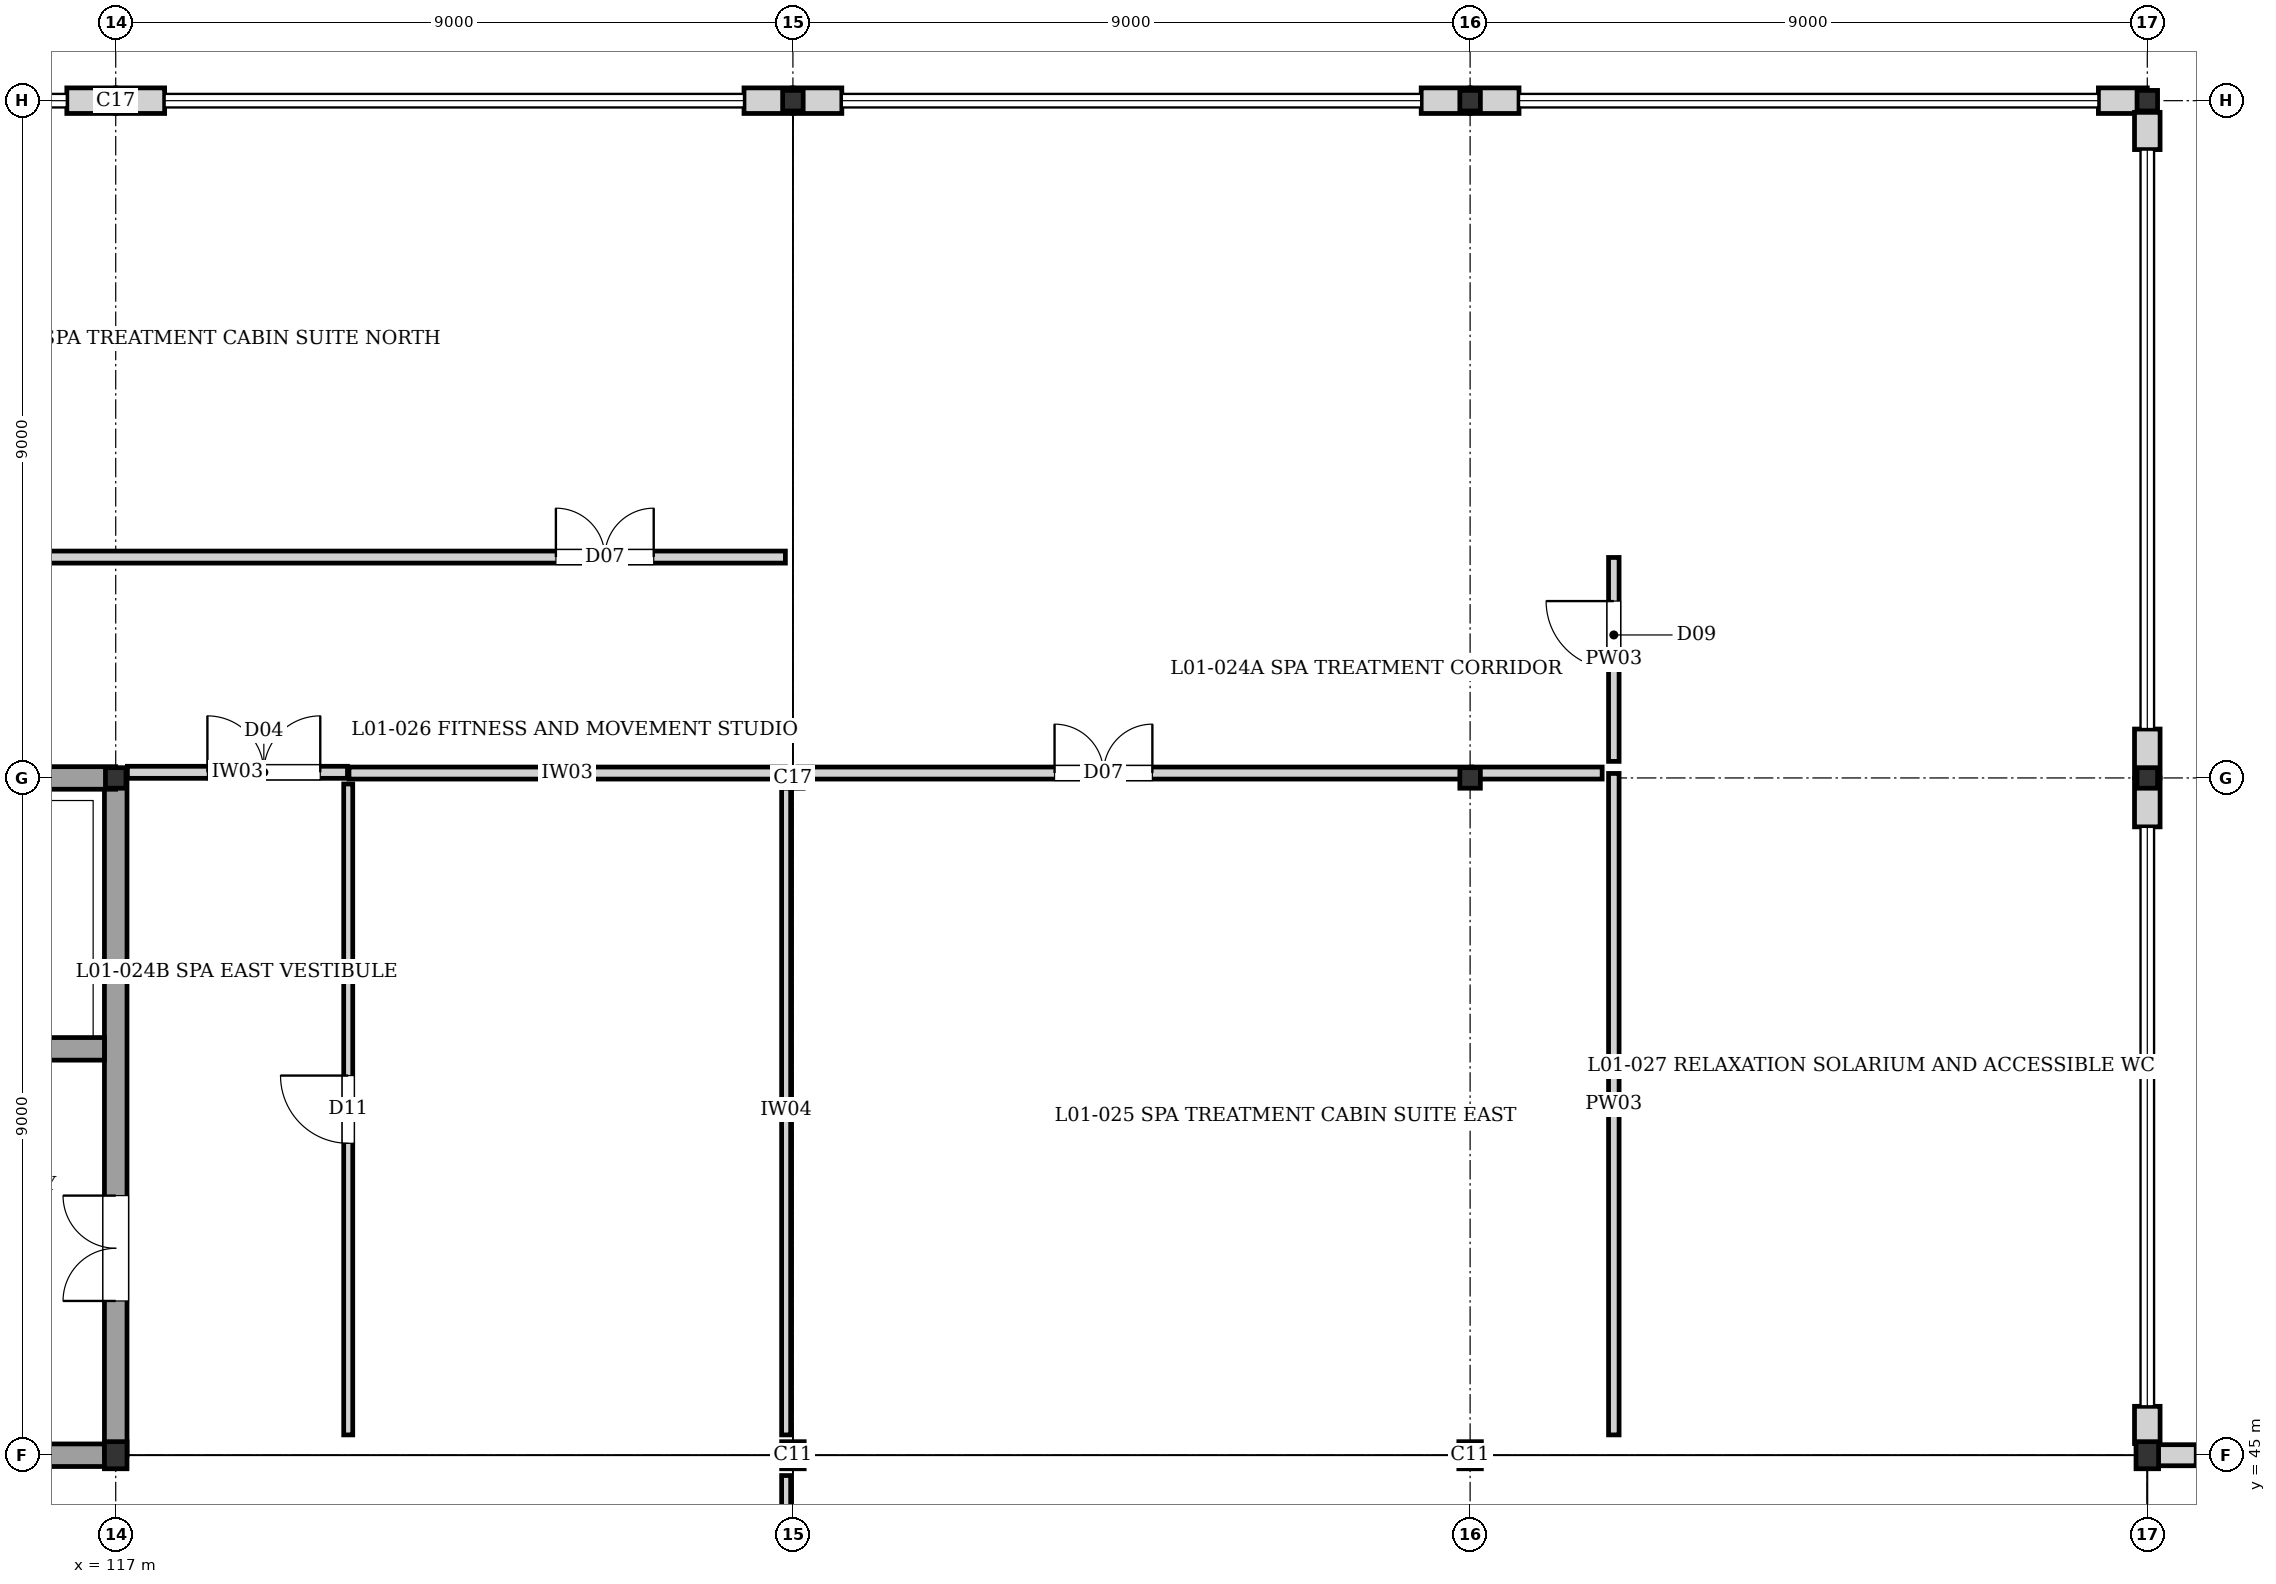
"""IFC4 building model, lengths in metres.
Left out: names, types, materials, properties, quantities, classifications, styles, units other than length and angle.
Written with IfcOpenShell. Run it as: python <this file> out.ifc"""

import sys

from ifc_helpers import new_model, si_unit, direction, frame, frame_2d, origin, origin_2d, place, context, subcontext, project, spatial, rectangle, hollow_circle, i_section, extrude, element, fill, save


model = new_model("IFC4")
c1 = context("Model", 3, precision=1e-05, world=origin(), true_north=direction((0.0, 1.0)))
c2 = subcontext(c1, "Body", "Model", "MODEL_VIEW")
j1 = project(units=[si_unit("LENGTHUNIT", "METRE"), si_unit("PLANEANGLEUNIT", "RADIAN")], contexts=[c1])
p1 = place(None, origin())
s1 = spatial("IfcSite", under=j1, at=p1, CompositionType="ELEMENT")
p2 = place(p1, origin())
s2 = spatial("IfcBuilding", under=s1, at=p2, CompositionType="ELEMENT")
p3 = place(p2, frame((0.0, 0.0, 4.32)))
s3 = spatial("IfcBuildingStorey", under=s2, at=p3, CompositionType="ELEMENT", Elevation=4.32)
p4 = place(p3, frame((117.0, 45.0, 0.0), z_axis=(0.0, 0.0, 1.0), x_axis=(1.0, 0.0, 0.0)))
e1 = element("IfcColumn", 1, at=p4, inside=s3, PredefinedType="COLUMN", context=c2, shape_type="SweptSolid", body=[
    extrude(i_section(OverallWidth=0.3, OverallDepth=0.36, WebThickness=0.012, FlangeThickness=0.022, at=origin_2d()), origin(), (0.0, 0.0, 1.0), 3.84),
])
for number, where, z_axis, x_axis in (
    (2, (117.0, 54.0, 0.0), (0.0, 0.0, 1.0), (1.0, 0.0, 0.0)),
    (3, (117.0, 63.0, 0.0), (0.0, 0.0, 1.0), (1.0, 0.0, 0.0)),
):
    element("IfcColumn", number, at=place(p3, frame(where, z_axis=z_axis, x_axis=x_axis)), inside=s3, PredefinedType="COLUMN", context=c2, shape_type="SweptSolid", body=[
        extrude(hollow_circle(Radius=0.136, WallThickness=0.012, at=origin_2d()), origin(), (0.0, 0.0, 1.0), 3.84),
    ])
p5 = place(p3, frame((126.0, 45.0, 0.0), z_axis=(0.0, 0.0, 1.0), x_axis=(1.0, 0.0, 0.0)))
e4 = element("IfcColumn", 4, at=p5, inside=s3, PredefinedType="COLUMN", context=c2, shape_type="SweptSolid", body=[
    extrude(i_section(OverallWidth=0.3, OverallDepth=0.36, WebThickness=0.012, FlangeThickness=0.022, at=origin_2d()), origin(), (0.0, 0.0, 1.0), 3.84),
])
for number, where, z_axis, x_axis in (
    (5, (126.0, 54.0, 0.0), (0.0, 0.0, 1.0), (1.0, 0.0, 0.0)),
    (6, (126.0, 63.0, 0.0), (0.0, 0.0, 1.0), (1.0, 0.0, 0.0)),
):
    element("IfcColumn", number, at=place(p3, frame(where, z_axis=z_axis, x_axis=x_axis)), inside=s3, PredefinedType="COLUMN", context=c2, shape_type="SweptSolid", body=[
        extrude(hollow_circle(Radius=0.136, WallThickness=0.012, at=origin_2d()), origin(), (0.0, 0.0, 1.0), 3.84),
    ])
p6 = place(p3, frame((135.0, 45.0, 0.0), z_axis=(0.0, 0.0, 1.0), x_axis=(1.0, 0.0, 0.0)))
e7 = element("IfcColumn", 7, at=p6, inside=s3, PredefinedType="COLUMN", context=c2, shape_type="SweptSolid", body=[
    extrude(i_section(OverallWidth=0.3, OverallDepth=0.36, WebThickness=0.012, FlangeThickness=0.022, at=origin_2d()), origin(), (0.0, 0.0, 1.0), 3.84),
])
for number, where, z_axis, x_axis in (
    (8, (135.0, 54.0, 0.0), (0.0, 0.0, 1.0), (1.0, 0.0, 0.0)),
    (9, (135.0, 63.0, 0.0), (0.0, 0.0, 1.0), (1.0, 0.0, 0.0)),
):
    element("IfcColumn", number, at=place(p3, frame(where, z_axis=z_axis, x_axis=x_axis)), inside=s3, PredefinedType="COLUMN", context=c2, shape_type="SweptSolid", body=[
        extrude(hollow_circle(Radius=0.136, WallThickness=0.012, at=origin_2d()), origin(), (0.0, 0.0, 1.0), 3.84),
    ])
p7 = place(p3, frame((144.0, 45.0, 0.0), z_axis=(0.0, 0.0, 1.0), x_axis=(1.0, 0.0, 0.0)))
e10 = element("IfcColumn", 10, at=p7, inside=s3, PredefinedType="COLUMN", context=c2, shape_type="SweptSolid", body=[
    extrude(i_section(OverallWidth=0.3, OverallDepth=0.36, WebThickness=0.012, FlangeThickness=0.022, at=origin_2d()), origin(), (0.0, 0.0, 1.0), 3.84),
])
for number, where, z_axis, x_axis in (
    (11, (144.0, 54.0, 0.0), (0.0, 0.0, 1.0), (1.0, 0.0, 0.0)),
    (12, (144.0, 63.0, 0.0), (0.0, 0.0, 1.0), (1.0, 0.0, 0.0)),
):
    element("IfcColumn", number, at=place(p3, frame(where, z_axis=z_axis, x_axis=x_axis)), inside=s3, PredefinedType="COLUMN", context=c2, shape_type="SweptSolid", body=[
        extrude(hollow_circle(Radius=0.136, WallThickness=0.012, at=origin_2d()), origin(), (0.0, 0.0, 1.0), 3.84),
    ])
p8 = place(p3, frame((116.35, 63.0, 0.0), z_axis=(0.0, 0.0, 1.0), x_axis=(1.0, 0.0, 0.0)))
e13 = element("IfcWall", 13, at=p8, inside=s3, PredefinedType="SOLIDWALL", context=c2, shape_type="SweptSolid", body=[
    extrude(rectangle(XDim=0.65, YDim=0.34, at=frame_2d((0.325, 0.0))), origin(), (0.0, 0.0, 1.0), 3.18),
])
for number, where, z_axis, x_axis in (
    (14, (117.0, 63.0, 0.0), (0.0, 0.0, 1.0), (1.0, 0.0, 0.0)),
    (15, (125.35, 63.0, 0.0), (0.0, 0.0, 1.0), (1.0, 0.0, 0.0)),
):
    element("IfcWall", number, at=place(p3, frame(where, z_axis=z_axis, x_axis=x_axis)), inside=s3, PredefinedType="SOLIDWALL", context=c2, shape_type="SweptSolid", body=[
        extrude(rectangle(XDim=0.65, YDim=0.34, at=frame_2d((0.325, 0.0))), origin(), (0.0, 0.0, 1.0), 3.35),
    ])
for number, where, z_axis, x_axis in (
    (16, (126.0, 63.0, 0.0), (0.0, 0.0, 1.0), (1.0, 0.0, 0.0)),
    (17, (134.35, 63.0, 0.0), (0.0, 0.0, 1.0), (1.0, 0.0, 0.0)),
):
    element("IfcWall", number, at=place(p3, frame(where, z_axis=z_axis, x_axis=x_axis)), inside=s3, PredefinedType="SOLIDWALL", context=c2, shape_type="SweptSolid", body=[
        extrude(rectangle(XDim=0.65, YDim=0.34, at=frame_2d((0.325, 0.0))), origin(), (0.0, 0.0, 1.0), 3.28),
    ])
for number, where, z_axis, x_axis in (
    (18, (135.0, 63.0, 0.0), (0.0, 0.0, 1.0), (1.0, 0.0, 0.0)),
    (19, (143.35, 63.0, 0.0), (0.0, 0.0, 1.0), (1.0, 0.0, 0.0)),
):
    element("IfcWall", number, at=place(p3, frame(where, z_axis=z_axis, x_axis=x_axis)), inside=s3, PredefinedType="SOLIDWALL", context=c2, shape_type="SweptSolid", body=[
        extrude(rectangle(XDim=0.65, YDim=0.34, at=frame_2d((0.325, 0.0))), origin(), (0.0, 0.0, 1.0), 3.22),
    ])
p9 = place(p3, frame((144.0, 62.845, 0.0), z_axis=(0.0, 0.0, 1.0), x_axis=(0.0, -1.0, 0.0)))
e20 = element("IfcWall", 20, at=p9, inside=s3, PredefinedType="SOLIDWALL", context=c2, shape_type="SweptSolid", body=[
    extrude(rectangle(XDim=0.495, YDim=0.34, at=frame_2d((0.248, 0.0))), origin(), (0.0, 0.0, 1.0), 3.59),
])
p10 = place(p3, frame((144.0, 54.65, 0.0), z_axis=(0.0, 0.0, 1.0), x_axis=(0.0, -1.0, 0.0)))
e21 = element("IfcWall", 21, at=p10, inside=s3, PredefinedType="SOLIDWALL", context=c2, shape_type="SweptSolid", body=[
    extrude(rectangle(XDim=0.65, YDim=0.34, at=frame_2d((0.325, 0.0))), origin(), (0.0, 0.0, 1.0), 3.09),
])
p11 = place(p3, frame((144.0, 54.0, 0.0), z_axis=(0.0, 0.0, 1.0), x_axis=(0.0, -1.0, 0.0)))
e22 = element("IfcWall", 22, at=p11, inside=s3, PredefinedType="SOLIDWALL", context=c2, shape_type="SweptSolid", body=[
    extrude(rectangle(XDim=0.65, YDim=0.34, at=frame_2d((0.325, 0.0))), origin(), (0.0, 0.0, 1.0), 3.14),
])
p12 = place(p3, frame((144.0, 45.65, 0.0), z_axis=(0.0, 0.0, 1.0), x_axis=(0.0, -1.0, 0.0)))
e23 = element("IfcWall", 23, at=p12, inside=s3, PredefinedType="SOLIDWALL", context=c2, shape_type="SweptSolid", body=[
    extrude(rectangle(XDim=0.495, YDim=0.34, at=frame_2d((0.248, 0.0))), origin(), (0.0, 0.0, 1.0), 3.59),
])
p13 = place(p3, frame((144.0, 45.0, 0.0), z_axis=(0.0, 0.0, 1.0), x_axis=(1.0, 0.0, 0.0)))
e24 = element("IfcWall", 24, at=p13, inside=s3, PredefinedType="SOLIDWALL", context=c2, shape_type="SweptSolid", body=[
    extrude(rectangle(XDim=0.65, YDim=0.28, at=frame_2d((0.325, 0.0))), origin(), (0.0, 0.0, 1.0), 3.18),
])
p14 = place(p3, frame((108.0, 45.0, 0.0), z_axis=(0.0, 0.0, 1.0), x_axis=(1.0, 0.0, 0.0)))
e25 = element("IfcWall", 25, at=p14, inside=s3, PredefinedType="SHEAR", context=c2, shape_type="SweptSolid", body=[
    extrude(rectangle(XDim=9.0, YDim=0.3, at=frame_2d((4.5, 0.0))), origin(), (0.0, 0.0, 1.0), 3.59),
])
p15 = place(p3, frame((117.0, 45.0, 0.0), z_axis=(0.0, 0.0, 1.0), x_axis=(0.0, 1.0, 0.0)))
e26 = element("IfcWall", 26, at=p15, inside=s3, PredefinedType="SHEAR", context=c2, shape_type="SweptSolid", body=[
    extrude(rectangle(XDim=9.0, YDim=0.3, at=frame_2d((4.5, 0.0))), origin(), (0.0, 0.0, 1.0), 3.59),
])
p16 = place(p15, frame((2.05, 0.0, 0.0)))
e27 = element("IfcOpeningElement", 27, at=p16, cuts=e26, PredefinedType="OPENING", context=c2, shape_type="SweptSolid", body=[
    extrude(rectangle(XDim=1.4, YDim=2.02, at=frame_2d((0.7, 1.01))), frame((0.0, 0.16, 0.0), z_axis=(0.0, -1.0, 0.0), x_axis=(1.0, 0.0, 0.0)), (0.0, 0.0, 1.0), 0.32),
])
p17 = place(p3, frame((108.0, 54.0, 0.0), z_axis=(0.0, 0.0, 1.0), x_axis=(1.0, 0.0, 0.0)))
e28 = element("IfcWall", 28, at=p17, inside=s3, PredefinedType="SHEAR", context=c2, shape_type="SweptSolid", body=[
    extrude(rectangle(XDim=9.0, YDim=0.3, at=frame_2d((4.5, 0.0))), origin(), (0.0, 0.0, 1.0), 3.59),
])
p18 = place(p3, frame((112.65, 50.4, 0.0), z_axis=(0.0, 0.0, 1.0), x_axis=(1.0, 0.0, 0.0)))
e29 = element("IfcWall", 29, at=p18, inside=s3, PredefinedType="SHEAR", context=c2, shape_type="SweptSolid", body=[
    extrude(rectangle(XDim=4.2, YDim=0.3, at=frame_2d((2.1, 0.0))), origin(), (0.0, 0.0, 1.0), 3.59),
])
p19 = place(p18, frame((1.5, 0.0, 0.0)))
e30 = element("IfcOpeningElement", 30, at=p19, cuts=e29, PredefinedType="OPENING", context=c2, shape_type="SweptSolid", body=[
    extrude(rectangle(XDim=1.2, YDim=2.2, at=frame_2d((0.6, 1.1))), frame((0.0, 0.16, 0.0), z_axis=(0.0, -1.0, 0.0), x_axis=(1.0, 0.0, 0.0)), (0.0, 0.0, 1.0), 0.32),
])
p20 = place(p3, frame((120.1, 54.065, 0.0), z_axis=(0.0, 0.0, 1.0), x_axis=(1.0, 0.0, 0.0)))
e31 = element("IfcWall", 31, at=p20, inside=s3, PredefinedType="PARTITIONING", context=c2, shape_type="SweptSolid", body=[
    extrude(rectangle(XDim=5.8, YDim=0.16, at=frame_2d((2.9, 0.0))), origin(), (0.0, 0.0, 1.0), 3.14),
])
p21 = place(p3, frame((125.91, 45.27, 0.0), z_axis=(0.0, 0.0, 1.0), x_axis=(0.0, 1.0, 0.0)))
e32 = element("IfcWall", 32, at=p21, inside=s3, PredefinedType="PARTITIONING", context=c2, shape_type="SweptSolid", body=[
    extrude(rectangle(XDim=8.64, YDim=0.12, at=frame_2d((4.32, 0.0))), origin(), (0.0, 0.0, 1.0), 3.25),
])
p22 = place(p3, frame((136.91, 45.27, 0.0), z_axis=(0.0, 0.0, 1.0), x_axis=(0.0, 1.0, 0.0)))
e33 = element("IfcWall", 33, at=p22, inside=s3, PredefinedType="PLUMBINGWALL", context=c2, shape_type="SweptSolid", body=[
    extrude(rectangle(XDim=8.79, YDim=0.14, at=frame_2d((4.395, 0.0))), origin(), (0.0, 0.0, 1.0), 3.59),
])
p23 = place(p3, frame((125.91, 36.145, 0.0), z_axis=(0.0, 0.0, 1.0), x_axis=(0.0, 1.0, 0.0)))
e34 = element("IfcWall", 34, at=p23, inside=s3, PredefinedType="PARTITIONING", context=c2, shape_type="SweptSolid", body=[
    extrude(rectangle(XDim=8.585, YDim=0.12, at=frame_2d((4.292, 0.0))), origin(), (0.0, 0.0, 1.0), 3.29),
])
p24 = place(p3, frame((117.155, 54.075, 0.0), z_axis=(0.0, 0.0, 1.0), x_axis=(1.0, 0.0, 0.0)))
e35 = element("IfcWall", 35, at=p24, inside=s3, PredefinedType="PARTITIONING", context=c2, shape_type="SweptSolid", body=[
    extrude(rectangle(XDim=2.925, YDim=0.16, at=frame_2d((1.462, 0.0))), origin(), (0.0, 0.0, 1.0), 3.14),
])
p25 = place(p24, frame((1.063, 0.0, 0.0)))
e36 = element("IfcOpeningElement", 36, at=p25, cuts=e35, PredefinedType="OPENING", context=c2, shape_type="SweptSolid", body=[
    extrude(rectangle(XDim=1.5, YDim=2.1, at=frame_2d((0.75, 1.05))), frame((0.0, 0.09, 0.0), z_axis=(0.0, -1.0, 0.0), x_axis=(1.0, 0.0, 0.0)), (0.0, 0.0, 1.0), 0.18),
])
p26 = place(p3, frame((108.065, 56.935, 0.0), z_axis=(0.0, 0.0, 1.0), x_axis=(1.0, 0.0, 0.0)))
e37 = element("IfcWall", 37, at=p26, inside=s3, PredefinedType="PARTITIONING", context=c2, shape_type="SweptSolid", body=[
    extrude(rectangle(XDim=17.835, YDim=0.16, at=frame_2d((8.917, 0.0))), origin(), (0.0, 0.0, 1.0), 3.59),
])
p27 = place(p26, frame((14.785, 0.0, 0.0)))
e38 = element("IfcOpeningElement", 38, at=p27, cuts=e37, PredefinedType="OPENING", context=c2, shape_type="SweptSolid", body=[
    extrude(rectangle(XDim=1.3, YDim=2.25, at=frame_2d((0.65, 1.125))), frame((0.0, 0.09, 0.0), z_axis=(0.0, -1.0, 0.0), x_axis=(1.0, 0.0, 0.0)), (0.0, 0.0, 1.0), 0.18),
])
p28 = place(p3, frame((126.065, 54.065, 0.0), z_axis=(0.0, 0.0, 1.0), x_axis=(1.0, 0.0, 0.0)))
e39 = element("IfcWall", 39, at=p28, inside=s3, PredefinedType="PARTITIONING", context=c2, shape_type="SweptSolid", body=[
    extrude(rectangle(XDim=8.955, YDim=0.16, at=frame_2d((4.478, 0.0))), origin(), (0.0, 0.0, 1.0), 3.09),
])
p29 = place(p28, frame((3.412, 0.0, 0.0)))
e40 = element("IfcOpeningElement", 40, at=p29, cuts=e39, PredefinedType="OPENING", context=c2, shape_type="SweptSolid", body=[
    extrude(rectangle(XDim=1.3, YDim=2.25, at=frame_2d((0.65, 1.125))), frame((0.0, 0.09, 0.0), z_axis=(0.0, -1.0, 0.0), x_axis=(1.0, 0.0, 0.0)), (0.0, 0.0, 1.0), 0.18),
])
p30 = place(p3, frame((136.91, 54.22, 0.0), z_axis=(0.0, 0.0, 1.0), x_axis=(0.0, 1.0, 0.0)))
e41 = element("IfcWall", 41, at=p30, inside=s3, PredefinedType="PLUMBINGWALL", context=c2, shape_type="SweptSolid", body=[
    extrude(rectangle(XDim=2.71, YDim=0.14, at=frame_2d((1.355, 0.0))), origin(), (0.0, 0.0, 1.0), 3.59),
])
p31 = place(p30, frame((1.23, 0.0, 0.0)))
e42 = element("IfcOpeningElement", 42, at=p31, cuts=e41, PredefinedType="OPENING", context=c2, shape_type="SweptSolid", body=[
    extrude(rectangle(XDim=0.9, YDim=2.1, at=frame_2d((0.45, 1.05))), frame((0.0, 0.08, 0.0), z_axis=(0.0, -1.0, 0.0), x_axis=(1.0, 0.0, 0.0)), (0.0, 0.0, 1.0), 0.16),
])
p32 = place(p3, frame((120.09, 45.27, 0.0), z_axis=(0.0, 0.0, 1.0), x_axis=(0.0, 1.0, 0.0)))
e43 = element("IfcWall", 43, at=p32, inside=s3, PredefinedType="PARTITIONING", context=c2, shape_type="SweptSolid", body=[
    extrude(rectangle(XDim=8.65, YDim=0.12, at=frame_2d((4.325, 0.0))), origin(), (0.0, 0.0, 1.0), 3.59),
])
p33 = place(p32, frame((3.875, 0.0, 0.0)))
e44 = element("IfcOpeningElement", 44, at=p33, cuts=e43, PredefinedType="OPENING", context=c2, shape_type="SweptSolid", body=[
    extrude(rectangle(XDim=0.9, YDim=2.2, at=frame_2d((0.45, 1.1))), frame((0.0, 0.07, 0.0), z_axis=(0.0, -1.0, 0.0), x_axis=(1.0, 0.0, 0.0)), (0.0, 0.0, 1.0), 0.14),
])
p34 = place(p3, frame((135.02, 54.065, 0.0), z_axis=(0.0, 0.0, 1.0), x_axis=(1.0, 0.0, 0.0)))
e45 = element("IfcWall", 45, at=p34, inside=s3, PredefinedType="PARTITIONING", context=c2, shape_type="SweptSolid", body=[
    extrude(rectangle(XDim=1.735, YDim=0.16, at=frame_2d((0.867, 0.0))), origin(), (0.0, 0.0, 1.0), 3.22),
])
p35 = place(p16, origin())
e46 = element("IfcDoor", 46, at=p35, inside=s3, OperationType="DOUBLE_DOOR_SINGLE_SWING", PredefinedType="DOOR", context=c2, shape_type="SweptSolid", body=[
    extrude(rectangle(XDim=1.4, YDim=2.02, at=frame_2d((0.7, 1.01))), frame((0.0, 0.025, 0.0), z_axis=(0.0, -1.0, 0.0), x_axis=(1.0, 0.0, 0.0)), (0.0, 0.0, 1.0), 0.05),
])
fill(e27, e46)
p36 = place(p25, origin())
e47 = element("IfcDoor", 47, at=p36, inside=s3, OperationType="DOUBLE_DOOR_SINGLE_SWING", PredefinedType="DOOR", context=c2, shape_type="SweptSolid", body=[
    extrude(rectangle(XDim=1.5, YDim=2.1, at=frame_2d((0.75, 1.05))), frame((0.0, 0.025, 0.0), z_axis=(0.0, -1.0, 0.0), x_axis=(1.0, 0.0, 0.0)), (0.0, 0.0, 1.0), 0.05),
])
fill(e36, e47)
p37 = place(p27, origin())
e48 = element("IfcDoor", 48, at=p37, inside=s3, OperationType="DOUBLE_DOOR_SINGLE_SWING", PredefinedType="DOOR", context=c2, shape_type="SweptSolid", body=[
    extrude(rectangle(XDim=1.3, YDim=2.25, at=frame_2d((0.65, 1.125))), frame((0.0, 0.025, 0.0), z_axis=(0.0, -1.0, 0.0), x_axis=(1.0, 0.0, 0.0)), (0.0, 0.0, 1.0), 0.05),
])
fill(e38, e48)
p38 = place(p29, origin())
e49 = element("IfcDoor", 49, at=p38, inside=s3, OperationType="DOUBLE_DOOR_SINGLE_SWING", PredefinedType="DOOR", context=c2, shape_type="SweptSolid", body=[
    extrude(rectangle(XDim=1.3, YDim=2.25, at=frame_2d((0.65, 1.125))), frame((0.0, 0.025, 0.0), z_axis=(0.0, -1.0, 0.0), x_axis=(1.0, 0.0, 0.0)), (0.0, 0.0, 1.0), 0.05),
])
fill(e40, e49)
p39 = place(p31, origin())
e50 = element("IfcDoor", 50, at=p39, inside=s3, OperationType="SINGLE_SWING_RIGHT", PredefinedType="DOOR", context=c2, shape_type="SweptSolid", body=[
    extrude(rectangle(XDim=0.9, YDim=2.1, at=frame_2d((0.45, 1.05))), frame((0.0, 0.025, 0.0), z_axis=(0.0, -1.0, 0.0), x_axis=(1.0, 0.0, 0.0)), (0.0, 0.0, 1.0), 0.05),
])
fill(e42, e50)
p40 = place(p33, origin())
e51 = element("IfcDoor", 51, at=p40, inside=s3, OperationType="SINGLE_SWING_RIGHT", PredefinedType="DOOR", context=c2, shape_type="SweptSolid", body=[
    extrude(rectangle(XDim=0.9, YDim=2.2, at=frame_2d((0.45, 1.1))), frame((0.0, 0.025, 0.0), z_axis=(0.0, -1.0, 0.0), x_axis=(1.0, 0.0, 0.0)), (0.0, 0.0, 1.0), 0.05),
])
fill(e44, e51)
save(model, sys.argv[1])
